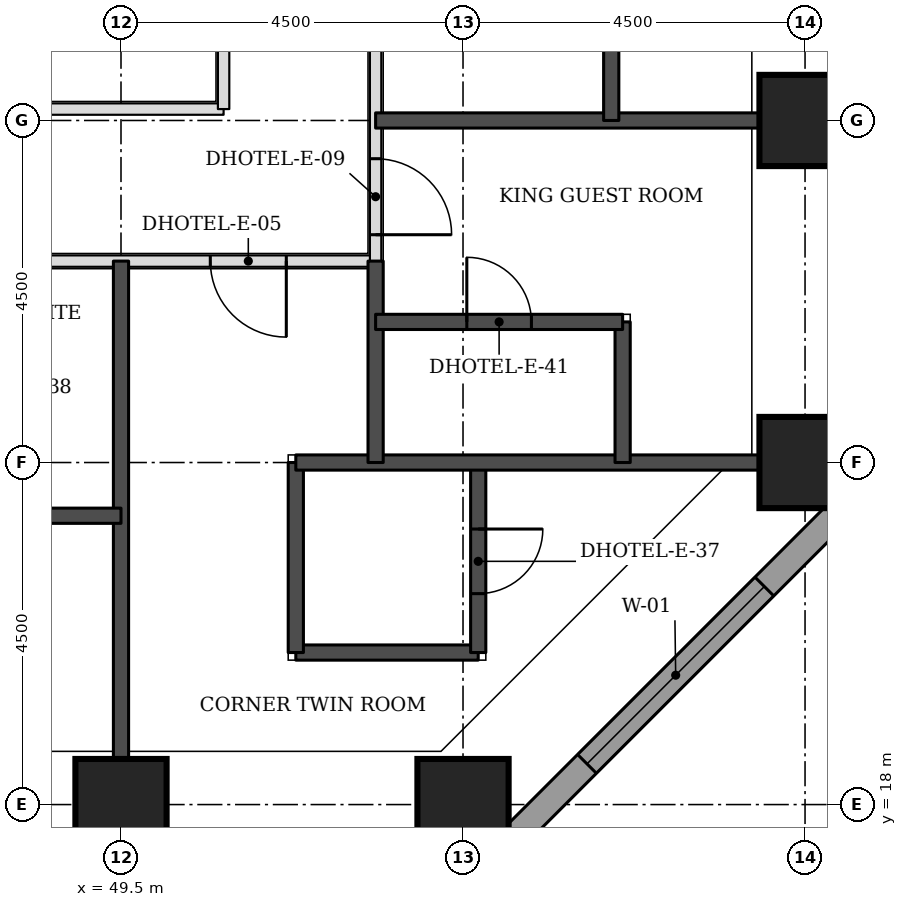
"""IFC4 building model, lengths in metres.
Left out: names, types, materials, properties, quantities, classifications, styles, units other than length and angle.
Written with IfcOpenShell. Run it as: python <this file> out.ifc"""

import sys

from ifc_helpers import new_model, si_unit, direction, frame, frame_2d, origin, origin_2d, place, context, subcontext, project, spatial, rectangle, extrude, element, fill, save


model = new_model("IFC4")
c1 = context("Model", 3, precision=1e-05, world=origin(), true_north=direction((0.0, 1.0)))
c2 = subcontext(c1, "Body", "Model", "MODEL_VIEW")
j1 = project(units=[si_unit("LENGTHUNIT", "METRE"), si_unit("PLANEANGLEUNIT", "RADIAN")], contexts=[c1])
p1 = place(None, origin())
s1 = spatial("IfcSite", under=j1, at=p1, CompositionType="ELEMENT")
p2 = place(p1, origin())
s2 = spatial("IfcBuilding", under=s1, at=p2, CompositionType="ELEMENT")
p3 = place(p2, frame((0.0, 0.0, 39.6)))
s3 = spatial("IfcBuildingStorey", under=s2, at=p3, CompositionType="ELEMENT", Elevation=39.6)
for number, where, z_axis, x_axis in (
    (1, (49.5, 18.0, 0.0), (0.0, 0.0, 1.0), (1.0, 0.0, 0.0)),
    (2, (54.0, 18.0, 0.0), (0.0, 0.0, 1.0), (1.0, 0.0, 0.0)),
    (3, (58.5, 22.5, 0.0), (0.0, 0.0, 1.0), (1.0, 0.0, 0.0)),
    (4, (58.5, 27.0, 0.0), (0.0, 0.0, 1.0), (1.0, 0.0, 0.0)),
):
    element("IfcColumn", number, at=place(p3, frame(where, z_axis=z_axis, x_axis=x_axis)), inside=s3, PredefinedType="COLUMN", context=c2, shape_type="SweptSolid", body=[
        extrude(rectangle(XDim=1.2, YDim=1.2, at=origin_2d()), origin(), (0.0, 0.0, 1.0), 3.3),
    ])
p4 = place(p3, frame((54.27, 17.174, 0.0), z_axis=(0.0, 0.0, 1.0), x_axis=(0.707106781187, 0.707106781187, 0.0)))
e5 = element("IfcWall", 5, at=p4, inside=s3, PredefinedType="STANDARD", context=c2, shape_type="SweptSolid", body=[
    extrude(rectangle(XDim=7.151, YDim=0.35, at=frame_2d((3.576, 0.0))), origin(), (0.0, 0.0, 1.0), 3.055),
])
p5 = place(p4, frame((1.926, 0.0, 0.8)))
e6 = element("IfcOpeningElement", 6, at=p5, cuts=e5, PredefinedType="OPENING", context=c2, shape_type="SweptSolid", body=[
    extrude(rectangle(XDim=3.3, YDim=1.5, at=frame_2d((1.65, 0.75))), frame((0.0, 0.185, 0.0), z_axis=(0.0, -1.0, 0.0), x_axis=(1.0, 0.0, 0.0)), (0.0, 0.0, 1.0), 0.37),
])
p6 = place(p3, frame((20.65, 25.15, 0.0), z_axis=(0.0, 0.0, 1.0), x_axis=(1.0, 0.0, 0.0)))
e7 = element("IfcWall", 7, at=p6, inside=s3, PredefinedType="PARTITIONING", context=c2, shape_type="SweptSolid", body=[
    extrude(rectangle(XDim=32.2, YDim=0.15, at=frame_2d((16.1, 0.0))), origin(), (0.0, 0.0, 1.0), 3.08),
])
p7 = place(p6, frame((4.375, 0.0, 0.0)))
e8 = element("IfcOpeningElement", 8, at=p7, cuts=e7, PredefinedType="OPENING", context=c2, shape_type="SweptSolid", body=[
    extrude(rectangle(XDim=1.0, YDim=2.1, at=frame_2d((0.5, 1.05))), frame((0.0, 0.085, 0.0), z_axis=(0.0, -1.0, 0.0), x_axis=(1.0, 0.0, 0.0)), (0.0, 0.0, 1.0), 0.17),
])
p8 = place(p6, frame((16.075, 0.0, 0.0)))
e9 = element("IfcOpeningElement", 9, at=p8, cuts=e7, PredefinedType="OPENING", context=c2, shape_type="SweptSolid", body=[
    extrude(rectangle(XDim=1.0, YDim=2.1, at=frame_2d((0.5, 1.05))), frame((0.0, 0.085, 0.0), z_axis=(0.0, -1.0, 0.0), x_axis=(1.0, 0.0, 0.0)), (0.0, 0.0, 1.0), 0.17),
])
p9 = place(p6, frame((22.375, 0.0, 0.0)))
e10 = element("IfcOpeningElement", 10, at=p9, cuts=e7, PredefinedType="OPENING", context=c2, shape_type="SweptSolid", body=[
    extrude(rectangle(XDim=1.0, YDim=2.1, at=frame_2d((0.5, 1.05))), frame((0.0, 0.085, 0.0), z_axis=(0.0, -1.0, 0.0), x_axis=(1.0, 0.0, 0.0)), (0.0, 0.0, 1.0), 0.17),
])
p10 = place(p6, frame((0.425, 0.0, 0.0)))
e11 = element("IfcOpeningElement", 11, at=p10, cuts=e7, PredefinedType="OPENING", context=c2, shape_type="SweptSolid", body=[
    extrude(rectangle(XDim=1.0, YDim=2.1, at=frame_2d((0.5, 1.05))), frame((0.0, 0.085, 0.0), z_axis=(0.0, -1.0, 0.0), x_axis=(1.0, 0.0, 0.0)), (0.0, 0.0, 1.0), 0.17),
])
p11 = place(p6, frame((30.025, 0.0, 0.0)))
e12 = element("IfcOpeningElement", 12, at=p11, cuts=e7, PredefinedType="OPENING", context=c2, shape_type="SweptSolid", body=[
    extrude(rectangle(XDim=1.0, YDim=2.1, at=frame_2d((0.5, 1.05))), frame((0.0, 0.085, 0.0), z_axis=(0.0, -1.0, 0.0), x_axis=(1.0, 0.0, 0.0)), (0.0, 0.0, 1.0), 0.17),
])
p12 = place(p3, frame((52.85, 25.15, 0.0), z_axis=(0.0, 0.0, 1.0), x_axis=(0.0, 1.0, 0.0)))
e13 = element("IfcWall", 13, at=p12, inside=s3, PredefinedType="PARTITIONING", context=c2, shape_type="SweptSolid", body=[
    extrude(rectangle(XDim=22.35, YDim=0.15, at=frame_2d((11.175, 0.0))), origin(), (0.0, 0.0, 1.0), 3.08),
])
p13 = place(p12, frame((0.347, 0.0, 0.0)))
e14 = element("IfcOpeningElement", 14, at=p13, cuts=e13, PredefinedType="OPENING", context=c2, shape_type="SweptSolid", body=[
    extrude(rectangle(XDim=1.0, YDim=2.1, at=frame_2d((0.5, 1.05))), frame((0.0, 0.085, 0.0), z_axis=(0.0, -1.0, 0.0), x_axis=(1.0, 0.0, 0.0)), (0.0, 0.0, 1.0), 0.17),
])
p14 = place(p12, frame((7.325, 0.0, 0.0)))
e15 = element("IfcOpeningElement", 15, at=p14, cuts=e13, PredefinedType="OPENING", context=c2, shape_type="SweptSolid", body=[
    extrude(rectangle(XDim=1.0, YDim=2.1, at=frame_2d((0.5, 1.05))), frame((0.0, 0.085, 0.0), z_axis=(0.0, -1.0, 0.0), x_axis=(1.0, 0.0, 0.0)), (0.0, 0.0, 1.0), 0.17),
])
p15 = place(p12, frame((11.675, 0.0, 0.0)))
e16 = element("IfcOpeningElement", 16, at=p15, cuts=e13, PredefinedType="OPENING", context=c2, shape_type="SweptSolid", body=[
    extrude(rectangle(XDim=1.0, YDim=2.1, at=frame_2d((0.5, 1.05))), frame((0.0, 0.085, 0.0), z_axis=(0.0, -1.0, 0.0), x_axis=(1.0, 0.0, 0.0)), (0.0, 0.0, 1.0), 0.17),
])
p16 = place(p12, frame((18.4, 0.0, 0.0)))
e17 = element("IfcOpeningElement", 17, at=p16, cuts=e13, PredefinedType="OPENING", context=c2, shape_type="SweptSolid", body=[
    extrude(rectangle(XDim=0.9, YDim=2.1, at=frame_2d((0.45, 1.05))), frame((0.0, 0.085, 0.0), z_axis=(0.0, -1.0, 0.0), x_axis=(1.0, 0.0, 0.0)), (0.0, 0.0, 1.0), 0.17),
])
p17 = place(p3, frame((40.5, 27.15, 0.0), z_axis=(0.0, 0.0, 1.0), x_axis=(1.0, 0.0, 0.0)))
e18 = element("IfcWall", 18, at=p17, inside=s3, PredefinedType="PARTITIONING", context=c2, shape_type="SweptSolid", body=[
    extrude(rectangle(XDim=10.35, YDim=0.15, at=frame_2d((5.175, 0.0))), origin(), (0.0, 0.0, 1.0), 3.08),
])
p18 = place(p3, frame((50.85, 27.15, 0.0), z_axis=(0.0, 0.0, 1.0), x_axis=(0.0, 1.0, 0.0)))
e19 = element("IfcWall", 19, at=p18, inside=s3, PredefinedType="PARTITIONING", context=c2, shape_type="SweptSolid", body=[
    extrude(rectangle(XDim=2.35, YDim=0.15, at=frame_2d((1.175, 0.0))), origin(), (0.0, 0.0, 1.0), 3.08),
])
p19 = place(p3, frame((49.5, 18.6, 0.0), z_axis=(0.0, 0.0, 1.0), x_axis=(0.0, 1.0, 0.0)))
e20 = element("IfcWall", 20, at=p19, inside=s3, PredefinedType="SOLIDWALL", context=c2, shape_type="SweptSolid", body=[
    extrude(rectangle(XDim=6.55, YDim=0.2, at=frame_2d((3.275, 0.0))), origin(), (0.0, 0.0, 1.0), 3.08),
])
p20 = place(p3, frame((51.8, 20.0, 0.0), z_axis=(0.0, 0.0, 1.0), x_axis=(1.0, 0.0, 0.0)))
e21 = element("IfcWall", 21, at=p20, inside=s3, PredefinedType="SOLIDWALL", context=c2, shape_type="SweptSolid", body=[
    extrude(rectangle(XDim=2.4, YDim=0.2, at=frame_2d((1.2, 0.0))), origin(), (0.0, 0.0, 1.0), 3.08),
])
p21 = place(p3, frame((51.8, 20.0, 0.0), z_axis=(0.0, 0.0, 1.0), x_axis=(0.0, 1.0, 0.0)))
e22 = element("IfcWall", 22, at=p21, inside=s3, PredefinedType="SOLIDWALL", context=c2, shape_type="SweptSolid", body=[
    extrude(rectangle(XDim=2.5, YDim=0.2, at=frame_2d((1.25, 0.0))), origin(), (0.0, 0.0, 1.0), 3.08),
])
p22 = place(p3, frame((54.2, 20.0, 0.0), z_axis=(0.0, 0.0, 1.0), x_axis=(0.0, 1.0, 0.0)))
e23 = element("IfcWall", 23, at=p22, inside=s3, PredefinedType="SOLIDWALL", context=c2, shape_type="SweptSolid", body=[
    extrude(rectangle(XDim=2.5, YDim=0.2, at=frame_2d((1.25, 0.0))), origin(), (0.0, 0.0, 1.0), 3.08),
])
p23 = place(p22, frame((0.775, 0.0, 0.0)))
e24 = element("IfcOpeningElement", 24, at=p23, cuts=e23, PredefinedType="OPENING", context=c2, shape_type="SweptSolid", body=[
    extrude(rectangle(XDim=0.85, YDim=2.1, at=frame_2d((0.425, 1.05))), frame((0.0, 0.11, 0.0), z_axis=(0.0, -1.0, 0.0), x_axis=(1.0, 0.0, 0.0)), (0.0, 0.0, 1.0), 0.22),
])
p24 = place(p3, frame((46.55, 21.8, 0.0), z_axis=(0.0, 0.0, 1.0), x_axis=(1.0, 0.0, 0.0)))
e25 = element("IfcWall", 25, at=p24, inside=s3, PredefinedType="SOLIDWALL", context=c2, shape_type="SweptSolid", body=[
    extrude(rectangle(XDim=2.95, YDim=0.2, at=frame_2d((1.475, 0.0))), origin(), (0.0, 0.0, 1.0), 3.08),
])
p25 = place(p3, frame((51.8, 22.5, 0.0), z_axis=(0.0, 0.0, 1.0), x_axis=(1.0, 0.0, 0.0)))
e26 = element("IfcWall", 26, at=p25, inside=s3, PredefinedType="SOLIDWALL", context=c2, shape_type="SweptSolid", body=[
    extrude(rectangle(XDim=6.1, YDim=0.2, at=frame_2d((3.05, 0.0))), origin(), (0.0, 0.0, 1.0), 3.08),
])
p26 = place(p3, frame((52.85, 22.5, 0.0), z_axis=(0.0, 0.0, 1.0), x_axis=(0.0, 1.0, 0.0)))
e27 = element("IfcWall", 27, at=p26, inside=s3, PredefinedType="SOLIDWALL", context=c2, shape_type="SweptSolid", body=[
    extrude(rectangle(XDim=2.65, YDim=0.2, at=frame_2d((1.325, 0.0))), origin(), (0.0, 0.0, 1.0), 3.08),
])
p27 = place(p3, frame((56.1, 22.5, 0.0), z_axis=(0.0, 0.0, 1.0), x_axis=(0.0, 1.0, 0.0)))
e28 = element("IfcWall", 28, at=p27, inside=s3, PredefinedType="SOLIDWALL", context=c2, shape_type="SweptSolid", body=[
    extrude(rectangle(XDim=1.85, YDim=0.2, at=frame_2d((0.925, 0.0))), origin(), (0.0, 0.0, 1.0), 3.08),
])
p28 = place(p3, frame((52.85, 24.35, 0.0), z_axis=(0.0, 0.0, 1.0), x_axis=(1.0, 0.0, 0.0)))
e29 = element("IfcWall", 29, at=p28, inside=s3, PredefinedType="SOLIDWALL", context=c2, shape_type="SweptSolid", body=[
    extrude(rectangle(XDim=3.25, YDim=0.2, at=frame_2d((1.625, 0.0))), origin(), (0.0, 0.0, 1.0), 3.08),
])
p29 = place(p28, frame((1.2, 0.0, 0.0)))
e30 = element("IfcOpeningElement", 30, at=p29, cuts=e29, PredefinedType="OPENING", context=c2, shape_type="SweptSolid", body=[
    extrude(rectangle(XDim=0.85, YDim=2.1, at=frame_2d((0.425, 1.05))), frame((0.0, 0.11, 0.0), z_axis=(0.0, -1.0, 0.0), x_axis=(1.0, 0.0, 0.0)), (0.0, 0.0, 1.0), 0.22),
])
p30 = place(p3, frame((52.85, 27.0, 0.0), z_axis=(0.0, 0.0, 1.0), x_axis=(1.0, 0.0, 0.0)))
e31 = element("IfcWall", 31, at=p30, inside=s3, PredefinedType="SOLIDWALL", context=c2, shape_type="SweptSolid", body=[
    extrude(rectangle(XDim=5.05, YDim=0.2, at=frame_2d((2.525, 0.0))), origin(), (0.0, 0.0, 1.0), 3.08),
])
p31 = place(p3, frame((55.95, 27.0, 0.0), z_axis=(0.0, 0.0, 1.0), x_axis=(0.0, 1.0, 0.0)))
e32 = element("IfcWall", 32, at=p31, inside=s3, PredefinedType="SOLIDWALL", context=c2, shape_type="SweptSolid", body=[
    extrude(rectangle(XDim=2.95, YDim=0.2, at=frame_2d((1.475, 0.0))), origin(), (0.0, 0.0, 1.0), 3.08),
])
p32 = place(p5, origin())
e33 = element("IfcWindow", 33, at=p32, inside=s3, PartitioningType="SINGLE_PANEL", PredefinedType="WINDOW", context=c2, shape_type="SweptSolid", body=[
    extrude(rectangle(XDim=3.3, YDim=1.5, at=frame_2d((1.65, 0.75))), frame((0.0, 0.085, 0.0), z_axis=(0.0, -1.0, 0.0), x_axis=(1.0, 0.0, 0.0)), (0.0, 0.0, 1.0), 0.06),
])
fill(e6, e33)
p33 = place(p13, frame((1.0, 0.0, 0.0), z_axis=(0.0, 0.0, 1.0), x_axis=(-1.0, 0.0, 0.0)))
e34 = element("IfcDoor", 34, at=p33, inside=s3, OperationType="SINGLE_SWING_RIGHT", PredefinedType="DOOR", context=c2, shape_type="SweptSolid", body=[
    extrude(rectangle(XDim=1.0, YDim=2.1, at=frame_2d((0.5, 1.05))), frame((0.0, 0.025, 0.0), z_axis=(0.0, -1.0, 0.0), x_axis=(1.0, 0.0, 0.0)), (0.0, 0.0, 1.0), 0.05),
])
fill(e14, e34)
p34 = place(p29, origin())
e35 = element("IfcDoor", 35, at=p34, inside=s3, OperationType="SINGLE_SWING_LEFT", PredefinedType="DOOR", context=c2, shape_type="SweptSolid", body=[
    extrude(rectangle(XDim=0.85, YDim=2.1, at=frame_2d((0.425, 1.05))), frame((0.0, 0.025, 0.0), z_axis=(0.0, -1.0, 0.0), x_axis=(1.0, 0.0, 0.0)), (0.0, 0.0, 1.0), 0.05),
])
fill(e30, e35)
p35 = place(p11, frame((1.0, 0.0, 0.0), z_axis=(0.0, 0.0, 1.0), x_axis=(-1.0, 0.0, 0.0)))
e36 = element("IfcDoor", 36, at=p35, inside=s3, OperationType="SINGLE_SWING_LEFT", PredefinedType="DOOR", context=c2, shape_type="SweptSolid", body=[
    extrude(rectangle(XDim=1.0, YDim=2.1, at=frame_2d((0.5, 1.05))), frame((0.0, 0.025, 0.0), z_axis=(0.0, -1.0, 0.0), x_axis=(1.0, 0.0, 0.0)), (0.0, 0.0, 1.0), 0.05),
])
fill(e12, e36)
p36 = place(p23, frame((0.85, 0.0, 0.0), z_axis=(0.0, 0.0, 1.0), x_axis=(-1.0, 0.0, 0.0)))
e37 = element("IfcDoor", 37, at=p36, inside=s3, OperationType="SINGLE_SWING_LEFT", PredefinedType="DOOR", context=c2, shape_type="SweptSolid", body=[
    extrude(rectangle(XDim=0.85, YDim=2.1, at=frame_2d((0.425, 1.05))), frame((0.0, 0.025, 0.0), z_axis=(0.0, -1.0, 0.0), x_axis=(1.0, 0.0, 0.0)), (0.0, 0.0, 1.0), 0.05),
])
fill(e24, e37)
save(model, sys.argv[1])
